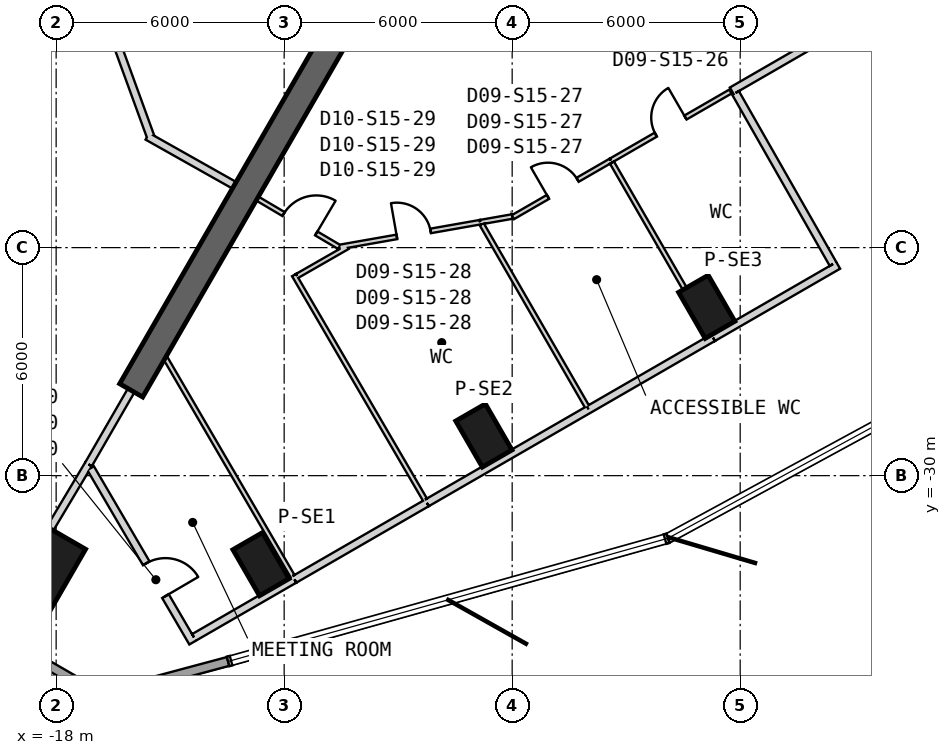
"""IFC4 building model, lengths in metres.
Left out: names, types, materials, properties, quantities, classifications, styles, units other than length and angle.
Written with IfcOpenShell. Run it as: python <this file> out.ifc"""

import sys

from ifc_helpers import new_model, si_unit, direction, frame, frame_2d, origin, origin_2d, place, context, subcontext, project, spatial, rectangle, extrude, element, fill, save


model = new_model("IFC4")
c1 = context("Model", 3, precision=1e-05, world=origin(), true_north=direction((0.0, 1.0)))
c2 = subcontext(c1, "Body", "Model", "MODEL_VIEW")
j1 = project(units=[si_unit("LENGTHUNIT", "METRE"), si_unit("PLANEANGLEUNIT", "RADIAN")], contexts=[c1])
p1 = place(None, origin())
s1 = spatial("IfcSite", under=j1, at=p1, CompositionType="ELEMENT")
p2 = place(p1, origin())
s2 = spatial("IfcBuilding", under=s1, at=p2, CompositionType="ELEMENT")
p3 = place(p2, frame((0.0, 0.0, 241.2)))
s3 = spatial("IfcBuildingStorey", under=s2, at=p3, CompositionType="ELEMENT", Elevation=241.2)
p4 = place(p3, frame((-18.785, -32.536, 0.0), z_axis=(0.0, 0.0, 1.0), x_axis=(-0.5, -0.866025403784, 0.0)))
e1 = element("IfcColumn", 1, at=p4, inside=s3, PredefinedType="COLUMN", context=c2, shape_type="SweptSolid", body=[
    extrude(rectangle(XDim=2.6, YDim=2.1, at=origin_2d()), origin(), (0.0, 0.0, 1.0), 4.0),
])
for number, where, z_axis, x_axis in (
    (2, (-12.609, -32.329, 0.0), (0.0, 0.0, 1.0), (0.5, -0.866, 0.0)),
    (3, (-6.745, -28.943, 0.0), (0.0, 0.0, 1.0), (0.5, -0.866, 0.0)),
    (4, (-0.881, -25.558, 0.0), (0.0, 0.0, 1.0), (0.5, -0.866, 0.0)),
):
    element("IfcColumn", number, at=place(p3, frame(where, z_axis=z_axis, x_axis=x_axis)), inside=s3, PredefinedType="COLUMN", context=c2, shape_type="SweptSolid", body=[
        extrude(rectangle(XDim=1.4, YDim=0.9, at=origin_2d()), origin(), (0.0, 0.0, 1.0), 4.0),
    ])
p5 = place(p3, frame((-10.575, -18.316, 0.0), z_axis=(0.0, 0.0, 1.0), x_axis=(-0.500002931134, -0.866023711487, 0.0)))
e5 = element("IfcWall", 5, at=p5, inside=s3, PredefinedType="SHEAR", context=c2, shape_type="SweptSolid", body=[
    extrude(rectangle(XDim=10.9, YDim=0.7, at=frame_2d((5.45, 0.0))), origin(), (0.0, 0.0, 1.0), 4.0),
])
p6 = place(p3, frame((-22.579, -32.466, 0.0), z_axis=(0.0, 0.0, 1.0), x_axis=(0.866017876419, -0.500013037552, 0.0)))
e6 = element("IfcWall", 6, at=p6, inside=s3, PredefinedType="SOLIDWALL", context=c2, shape_type="SweptSolid", body=[
    extrude(rectangle(XDim=6.642, YDim=0.24, at=frame_2d((3.321, 0.0))), origin(), (0.0, 0.0, 1.0), 3.7),
])
p7 = place(p3, frame((-16.827, -35.787, 0.0), z_axis=(0.0, 0.0, 1.0), x_axis=(0.96593768865, 0.258774770111, 0.0)))
e7 = element("IfcWall", 7, at=p7, inside=s3, PredefinedType="SOLIDWALL", context=c2, shape_type="SweptSolid", body=[
    extrude(rectangle(XDim=3.47, YDim=0.24, at=frame_2d((1.735, 0.0))), origin(), (0.0, 0.0, 1.0), 3.7),
])
p8 = place(p3, frame((-15.598, -21.072, 0.0), z_axis=(0.0, 0.0, 1.0), x_axis=(0.871234731294, -0.490866624438, 0.0)))
e8 = element("IfcWall", 8, at=p8, inside=s3, PredefinedType="PARTITIONING", context=c2, shape_type="SweptSolid", body=[
    extrude(rectangle(XDim=2.623, YDim=0.2, at=frame_2d((1.311, 0.0))), origin(), (0.0, 0.0, 1.0), 3.7),
])
p9 = place(p3, frame((-17.134, -16.629, 0.0), z_axis=(0.0, 0.0, 1.0), x_axis=(0.342036655594, -0.939686610647, 0.0)))
e9 = element("IfcWall", 9, at=p9, inside=s3, PredefinedType="PARTITIONING", context=c2, shape_type="SweptSolid", body=[
    extrude(rectangle(XDim=4.74, YDim=0.2, at=frame_2d((2.37, 0.0))), origin(), (0.0, 0.0, 1.0), 2.88),
])
p10 = place(p3, frame((-0.223, -19.874, 0.0), z_axis=(0.0, 0.0, 1.0), x_axis=(0.866025366729, 0.500000064182, 0.0)))
e10 = element("IfcWall", 10, at=p10, inside=s3, PredefinedType="PARTITIONING", context=c2, shape_type="SweptSolid", body=[
    extrude(rectangle(XDim=12.18, YDim=0.2, at=frame_2d((6.09, 0.0))), origin(), (0.0, 0.0, 1.0), 3.07),
])
p11 = place(p3, frame((-5.984, -23.2, 0.0), z_axis=(0.0, 0.0, 1.0), x_axis=(0.866005448672, 0.500034561676, 0.0)))
e11 = element("IfcWall", 11, at=p11, inside=s3, PredefinedType="PARTITIONING", context=c2, shape_type="SweptSolid", body=[
    extrude(rectangle(XDim=2.979, YDim=0.12, at=frame_2d((1.49, 0.0))), origin(), (0.0, 0.0, 1.0), 2.98),
])
p12 = place(p11, frame((1.07, 0.0, 0.0)))
e12 = element("IfcOpeningElement", 12, at=p12, cuts=e11, PredefinedType="OPENING", context=c2, shape_type="SweptSolid", body=[
    extrude(rectangle(XDim=0.9, YDim=2.1, at=frame_2d((0.45, 1.05))), frame((0.0, 0.07, 0.0), z_axis=(0.0, -1.0, 0.0), x_axis=(1.0, 0.0, 0.0)), (0.0, 0.0, 1.0), 0.14),
])
p13 = place(p3, frame((-3.404, -21.711, 0.0), z_axis=(0.0, 0.0, 1.0), x_axis=(0.866022210963, 0.500005530088, 0.0)))
e13 = element("IfcWall", 13, at=p13, inside=s3, PredefinedType="PARTITIONING", context=c2, shape_type="SweptSolid", body=[
    extrude(rectangle(XDim=3.633, YDim=0.12, at=frame_2d((1.817, 0.0))), origin(), (0.0, 0.0, 1.0), 2.98),
])
p14 = place(p13, frame((1.367, 0.0, 0.0)))
e14 = element("IfcOpeningElement", 14, at=p14, cuts=e13, PredefinedType="OPENING", context=c2, shape_type="SweptSolid", body=[
    extrude(rectangle(XDim=0.9, YDim=2.1, at=frame_2d((0.45, 1.05))), frame((0.0, 0.07, 0.0), z_axis=(0.0, -1.0, 0.0), x_axis=(1.0, 0.0, 0.0)), (0.0, 0.0, 1.0), 0.14),
])
p15 = place(p3, frame((-10.55, -23.985, 0.0), z_axis=(0.0, 0.0, 1.0), x_axis=(0.984807711093, 0.1736484154, 0.0)))
e15 = element("IfcWall", 15, at=p15, inside=s3, PredefinedType="PARTITIONING", context=c2, shape_type="SweptSolid", body=[
    extrude(rectangle(XDim=3.764, YDim=0.12, at=frame_2d((1.882, 0.0))), origin(), (0.0, 0.0, 1.0), 2.88),
])
p16 = place(p15, frame((1.54, 0.0, 0.0)))
e16 = element("IfcOpeningElement", 16, at=p16, cuts=e15, PredefinedType="OPENING", context=c2, shape_type="SweptSolid", body=[
    extrude(rectangle(XDim=0.9, YDim=2.1, at=frame_2d((0.45, 1.05))), frame((0.0, 0.07, 0.0), z_axis=(0.0, -1.0, 0.0), x_axis=(1.0, 0.0, 0.0)), (0.0, 0.0, 1.0), 0.14),
])
p17 = place(p3, frame((-6.843, -23.331, 0.0), z_axis=(0.0, 0.0, 1.0), x_axis=(0.98477787699, 0.173817527858, 0.0)))
e17 = element("IfcWall", 17, at=p17, inside=s3, PredefinedType="PARTITIONING", context=c2, shape_type="SweptSolid", body=[
    extrude(rectangle(XDim=0.865, YDim=0.12, at=frame_2d((0.433, 0.0))), origin(), (0.0, 0.0, 1.0), 3.7),
])
p18 = place(p3, frame((-12.707, -22.709, 0.0), z_axis=(0.0, 0.0, 1.0), x_axis=(0.860742216303, -0.509041095663, 0.0)))
e18 = element("IfcWall", 18, at=p18, inside=s3, PredefinedType="PARTITIONING", context=c2, shape_type="SweptSolid", body=[
    extrude(rectangle(XDim=2.506, YDim=0.12, at=frame_2d((1.253, 0.0))), origin(), (0.0, 0.0, 1.0), 3.7),
])
p19 = place(p18, frame((0.803, 0.0, 0.0)))
e19 = element("IfcOpeningElement", 19, at=p19, cuts=e18, PredefinedType="OPENING", context=c2, shape_type="SweptSolid", body=[
    extrude(rectangle(XDim=1.0, YDim=2.1, at=frame_2d((0.5, 1.05))), frame((0.0, 0.07, 0.0), z_axis=(0.0, -1.0, 0.0), x_axis=(1.0, 0.0, 0.0)), (0.0, 0.0, 1.0), 0.14),
])
p20 = place(p3, frame((-17.149, -29.702, 0.0), z_axis=(0.0, 0.0, 1.0), x_axis=(0.500042241774, 0.866001014111, 0.0)))
e20 = element("IfcWall", 20, at=p20, inside=s3, PredefinedType="PARTITIONING", context=c2, shape_type="SweptSolid", body=[
    extrude(rectangle(XDim=2.247, YDim=0.2, at=frame_2d((1.124, 0.0))), origin(), (0.0, 0.0, 1.0), 3.27),
])
p21 = place(p3, frame((-18.161, -31.396, 0.0), z_axis=(0.0, 0.0, 1.0), x_axis=(0.512692976909, 0.858572018778, 0.0)))
e21 = element("IfcWall", 21, at=p21, inside=s3, PredefinedType="PARTITIONING", context=c2, shape_type="SweptSolid", body=[
    extrude(rectangle(XDim=1.973, YDim=0.2, at=frame_2d((0.986, 0.0))), origin(), (0.0, 0.0, 1.0), 3.27),
])
p22 = place(p3, frame((2.58, -24.468, 0.0), z_axis=(0.0, 0.0, 1.0), x_axis=(-0.866042353438, -0.49997064119, 0.0)))
e22 = element("IfcWall", 22, at=p22, inside=s3, PredefinedType="PARTITIONING", context=c2, shape_type="SweptSolid", body=[
    extrude(rectangle(XDim=3.803, YDim=0.2, at=frame_2d((1.902, 0.0))), origin(), (0.0, 0.0, 1.0), 3.7),
])
p23 = place(p3, frame((-0.714, -26.37, 0.0), z_axis=(0.0, 0.0, 1.0), x_axis=(-0.866008069365, -0.500030022893, 0.0)))
e23 = element("IfcWall", 23, at=p23, inside=s3, PredefinedType="PARTITIONING", context=c2, shape_type="SweptSolid", body=[
    extrude(rectangle(XDim=3.779, YDim=0.2, at=frame_2d((1.89, 0.0))), origin(), (0.0, 0.0, 1.0), 3.7),
])
p24 = place(p3, frame((-3.987, -28.26, 0.0), z_axis=(0.0, 0.0, 1.0), x_axis=(-0.866025160694, -0.500000421045, 0.0)))
e24 = element("IfcWall", 24, at=p24, inside=s3, PredefinedType="PARTITIONING", context=c2, shape_type="SweptSolid", body=[
    extrude(rectangle(XDim=4.917, YDim=0.2, at=frame_2d((2.458, 0.0))), origin(), (0.0, 0.0, 1.0), 3.7),
])
p25 = place(p3, frame((-8.245, -30.718, 0.0), z_axis=(0.0, 0.0, 1.0), x_axis=(-0.866039076139, -0.49997631804, 0.0)))
e25 = element("IfcWall", 25, at=p25, inside=s3, PredefinedType="PARTITIONING", context=c2, shape_type="SweptSolid", body=[
    extrude(rectangle(XDim=4.024, YDim=0.2, at=frame_2d((2.012, 0.0))), origin(), (0.0, 0.0, 1.0), 3.7),
])
p26 = place(p3, frame((-11.729, -32.729, 0.0), z_axis=(0.0, 0.0, 1.0), x_axis=(-0.866009774538, -0.500027069672, 0.0)))
e26 = element("IfcWall", 26, at=p26, inside=s3, PredefinedType="PARTITIONING", context=c2, shape_type="SweptSolid", body=[
    extrude(rectangle(XDim=3.052, YDim=0.2, at=frame_2d((1.526, 0.0))), origin(), (0.0, 0.0, 1.0), 3.7),
])
p27 = place(p3, frame((2.444, -24.431, 0.0), z_axis=(0.0, 0.0, 1.0), x_axis=(-0.495153952563, 0.86880525048, 0.0)))
e27 = element("IfcWall", 27, at=p27, inside=s3, PredefinedType="PARTITIONING", context=c2, shape_type="SweptSolid", body=[
    extrude(rectangle(XDim=5.18, YDim=0.2, at=frame_2d((2.59, 0.0))), origin(), (0.0, 0.0, 1.0), 3.7),
])
p28 = place(p3, frame((-17.093, -29.803, 0.0), z_axis=(0.0, 0.0, 1.0), x_axis=(0.504838763147, -0.863213660239, 0.0)))
e28 = element("IfcWall", 28, at=p28, inside=s3, PredefinedType="PARTITIONING", context=c2, shape_type="SweptSolid", body=[
    extrude(rectangle(XDim=5.316, YDim=0.2, at=frame_2d((2.658, 0.0))), origin(), (0.0, 0.0, 1.0), 3.27),
])
p29 = place(p28, frame((2.9, 0.0, 0.0)))
e29 = element("IfcOpeningElement", 29, at=p29, cuts=e28, PredefinedType="OPENING", context=c2, shape_type="SweptSolid", body=[
    extrude(rectangle(XDim=1.0, YDim=2.1, at=frame_2d((0.5, 1.05))), frame((0.0, 0.11, 0.0), z_axis=(0.0, -1.0, 0.0), x_axis=(1.0, 0.0, 0.0)), (0.0, 0.0, 1.0), 0.22),
])
p30 = place(p3, frame((-0.764, -26.283, 0.0), z_axis=(0.0, 0.0, 1.0), x_axis=(-0.499972115377, 0.86604150238, 0.0)))
e30 = element("IfcWall", 30, at=p30, inside=s3, PredefinedType="PARTITIONING", context=c2, shape_type="SweptSolid", body=[
    extrude(rectangle(XDim=5.22, YDim=0.12, at=frame_2d((2.61, 0.0))), origin(), (0.0, 0.0, 1.0), 3.7),
])
p31 = place(p3, frame((-4.037, -28.173, 0.0), z_axis=(0.0, 0.0, 1.0), x_axis=(-0.500014212531, 0.86601719802, 0.0)))
e31 = element("IfcWall", 31, at=p31, inside=s3, PredefinedType="PARTITIONING", context=c2, shape_type="SweptSolid", body=[
    extrude(rectangle(XDim=5.529, YDim=0.12, at=frame_2d((2.765, 0.0))), origin(), (0.0, 0.0, 1.0), 2.98),
])
p32 = place(p3, frame((-8.295, -30.631, 0.0), z_axis=(0.0, 0.0, 1.0), x_axis=(-0.503768936745, 0.863838444601, 0.0)))
e32 = element("IfcWall", 32, at=p32, inside=s3, PredefinedType="PARTITIONING", context=c2, shape_type="SweptSolid", body=[
    extrude(rectangle(XDim=6.84, YDim=0.12, at=frame_2d((3.42, 0.0))), origin(), (0.0, 0.0, 1.0), 2.88),
])
p33 = place(p3, frame((-10.331, -23.984, 0.0), z_axis=(0.0, 0.0, 1.0), x_axis=(-0.867505637863, -0.497427349746, 0.0)))
e33 = element("IfcWall", 33, at=p33, inside=s3, PredefinedType="PARTITIONING", context=c2, shape_type="SweptSolid", body=[
    extrude(rectangle(XDim=1.53, YDim=0.12, at=frame_2d((0.765, 0.0))), origin(), (0.0, 0.0, 1.0), 3.7),
])
p34 = place(p3, frame((-15.128, -26.902, 0.0), z_axis=(0.0, 0.0, 1.0), x_axis=(0.503743114679, -0.863853502866, 0.0)))
e34 = element("IfcWall", 34, at=p34, inside=s3, PredefinedType="PARTITIONING", context=c2, shape_type="SweptSolid", body=[
    extrude(rectangle(XDim=6.646, YDim=0.12, at=frame_2d((3.323, 0.0))), origin(), (0.0, 0.0, 1.0), 2.88),
])
p35 = place(p14, origin())
e35 = element("IfcDoor", 35, at=p35, inside=s3, OperationType="SINGLE_SWING_RIGHT", PredefinedType="NOTDEFINED", context=c2, shape_type="SweptSolid", body=[
    extrude(rectangle(XDim=0.9, YDim=2.1, at=frame_2d((0.45, 1.05))), frame((0.0, 0.025, 0.0), z_axis=(0.0, -1.0, 0.0), x_axis=(1.0, 0.0, 0.0)), (0.0, 0.0, 1.0), 0.05),
])
fill(e14, e35)
p36 = place(p12, origin())
e36 = element("IfcDoor", 36, at=p36, inside=s3, OperationType="SINGLE_SWING_RIGHT", PredefinedType="NOTDEFINED", context=c2, shape_type="SweptSolid", body=[
    extrude(rectangle(XDim=0.9, YDim=2.1, at=frame_2d((0.45, 1.05))), frame((0.0, 0.025, 0.0), z_axis=(0.0, -1.0, 0.0), x_axis=(1.0, 0.0, 0.0)), (0.0, 0.0, 1.0), 0.05),
])
fill(e12, e36)
p37 = place(p16, origin())
e37 = element("IfcDoor", 37, at=p37, inside=s3, OperationType="SINGLE_SWING_LEFT", PredefinedType="NOTDEFINED", context=c2, shape_type="SweptSolid", body=[
    extrude(rectangle(XDim=0.9, YDim=2.1, at=frame_2d((0.45, 1.05))), frame((0.0, 0.025, 0.0), z_axis=(0.0, -1.0, 0.0), x_axis=(1.0, 0.0, 0.0)), (0.0, 0.0, 1.0), 0.05),
])
fill(e16, e37)
p38 = place(p19, origin())
e38 = element("IfcDoor", 38, at=p38, inside=s3, OperationType="SINGLE_SWING_LEFT", PredefinedType="NOTDEFINED", context=c2, shape_type="SweptSolid", body=[
    extrude(rectangle(XDim=1.0, YDim=2.1, at=frame_2d((0.5, 1.05))), frame((0.0, 0.025, 0.0), z_axis=(0.0, -1.0, 0.0), x_axis=(1.0, 0.0, 0.0)), (0.0, 0.0, 1.0), 0.05),
])
fill(e19, e38)
p39 = place(p29, origin())
e39 = element("IfcDoor", 39, at=p39, inside=s3, OperationType="SINGLE_SWING_LEFT", PredefinedType="USERDEFINED", context=c2, shape_type="SweptSolid", body=[
    extrude(rectangle(XDim=1.0, YDim=2.1, at=frame_2d((0.5, 1.05))), frame((0.0, 0.025, 0.0), z_axis=(0.0, -1.0, 0.0), x_axis=(1.0, 0.0, 0.0)), (0.0, 0.0, 1.0), 0.05),
])
fill(e29, e39)
save(model, sys.argv[1])
